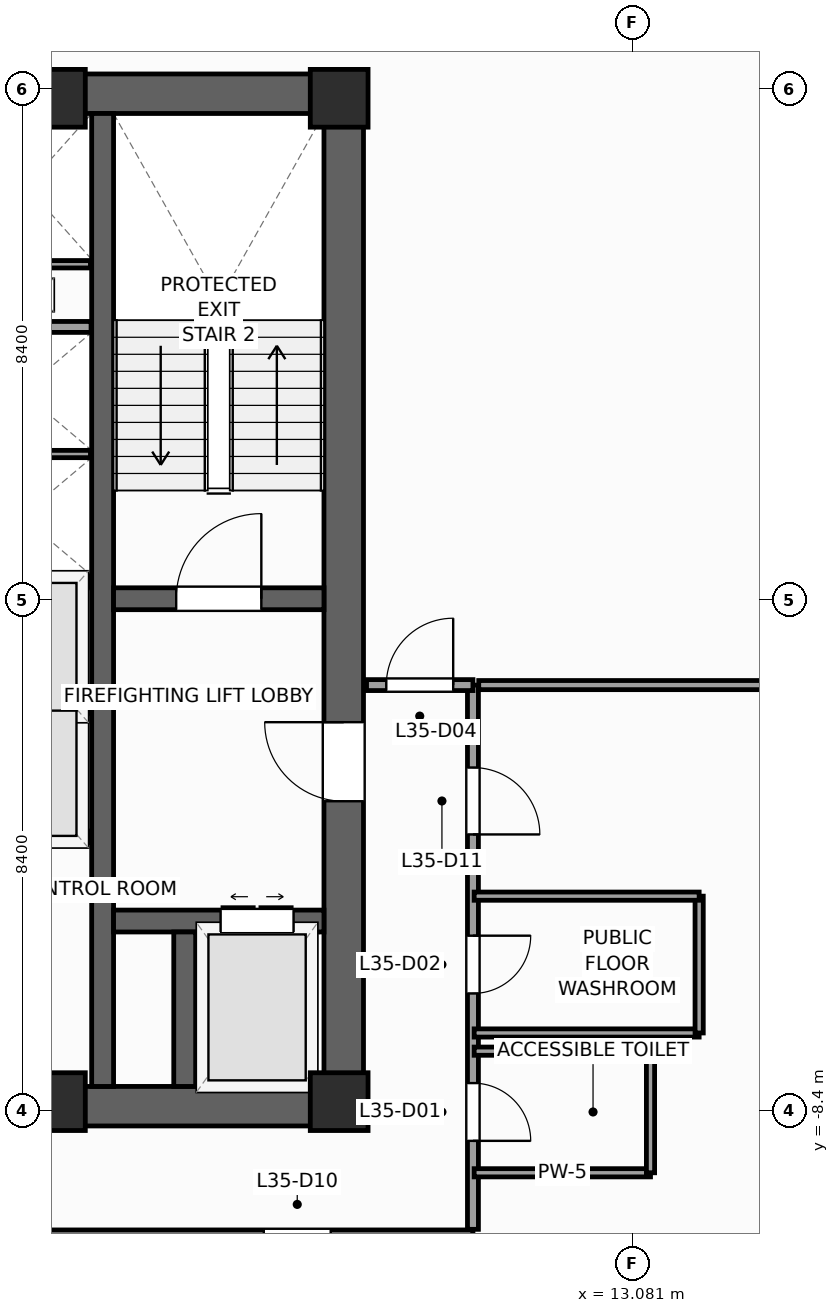
"""IFC4 building model, lengths in metres.
Left out: names, types, materials, properties, quantities, classifications, styles, units other than length and angle.
Written with IfcOpenShell. Run it as: python <this file> out.ifc"""

import sys

from ifc_helpers import new_model, si_unit, direction, frame, frame_2d, origin, origin_2d, place, context, subcontext, project, spatial, rectangle, extrude, source, transform, mapped, element, fill, save


model = new_model("IFC4")
c1 = context("Model", 3, precision=1e-05, world=origin(), true_north=direction((0.0, 1.0)))
c2 = subcontext(c1, "Body", "Model", "MODEL_VIEW")
j1 = project(units=[si_unit("LENGTHUNIT", "METRE"), si_unit("PLANEANGLEUNIT", "RADIAN")], contexts=[c1])
p1 = place(None, origin())
s1 = spatial("IfcSite", under=j1, at=p1, CompositionType="ELEMENT")
p2 = place(p1, origin())
s2 = spatial("IfcBuilding", under=s1, at=p2, CompositionType="ELEMENT")
p3 = place(p2, frame((0.0, 0.0, 148.4)))
s3 = spatial("IfcBuildingStorey", under=s2, at=p3, CompositionType="ELEMENT", Elevation=148.4)
p4 = place(p3, frame((-8.65, -8.325, 0.0), z_axis=(0.0, 0.0, 1.0), x_axis=(1.0, 0.0, 0.0)))
e1 = element("IfcWall", 1, at=p4, inside=s3, PredefinedType="SHEAR", context=c2, shape_type="SweptSolid", body=[
    extrude(rectangle(XDim=17.3, YDim=0.65, at=frame_2d((8.65, 0.0))), origin(), (0.0, 0.0, 1.0), 4.0),
])
p5 = place(p4, frame((8.0, 0.0, 0.0)))
e2 = element("IfcOpeningElement", 2, at=p5, cuts=e1, PredefinedType="OPENING", context=c2, shape_type="SweptSolid", body=[
    extrude(rectangle(XDim=1.3, YDim=2.2, at=frame_2d((0.65, 1.1))), frame((0.0, 0.335, 0.0), z_axis=(0.0, -1.0, 0.0), x_axis=(1.0, 0.0, 0.0)), (0.0, 0.0, 1.0), 0.67),
])
p6 = place(p3, frame((-8.65, 8.325, 0.0), z_axis=(0.0, 0.0, 1.0), x_axis=(1.0, 0.0, 0.0)))
e3 = element("IfcWall", 3, at=p6, inside=s3, PredefinedType="SHEAR", context=c2, shape_type="SweptSolid", body=[
    extrude(rectangle(XDim=17.3, YDim=0.65, at=frame_2d((8.65, 0.0))), origin(), (0.0, 0.0, 1.0), 4.0),
])
p7 = place(p3, frame((8.325, -8.0, 0.0), z_axis=(0.0, 0.0, 1.0), x_axis=(0.0, 1.0, 0.0)))
e4 = element("IfcWall", 4, at=p7, inside=s3, PredefinedType="SHEAR", context=c2, shape_type="SweptSolid", body=[
    extrude(rectangle(XDim=16.0, YDim=0.65, at=frame_2d((8.0, 0.0))), origin(), (0.0, 0.0, 1.0), 4.0),
])
p8 = place(p7, frame((4.69, 0.0, 0.0)))
e5 = element("IfcOpeningElement", 5, at=p8, cuts=e4, PredefinedType="OPENING", context=c2, shape_type="SweptSolid", body=[
    extrude(rectangle(XDim=1.3, YDim=2.2, at=frame_2d((0.65, 1.1))), frame((0.0, 0.335, 0.0), z_axis=(0.0, -1.0, 0.0), x_axis=(1.0, 0.0, 0.0)), (0.0, 0.0, 1.0), 0.67),
])
p9 = place(p3, frame((4.36, -8.0, 0.0), z_axis=(0.0, 0.0, 1.0), x_axis=(0.0, 1.0, 0.0)))
e6 = element("IfcWall", 6, at=p9, inside=s3, PredefinedType="SHEAR", context=c2, shape_type="SweptSolid", body=[
    extrude(rectangle(XDim=16.0, YDim=0.36, at=frame_2d((8.0, 0.0))), origin(), (0.0, 0.0, 1.0), 4.0),
])
p10 = place(p3, frame((4.54, 0.02, 0.0), z_axis=(0.0, 0.0, 1.0), x_axis=(1.0, 0.0, 0.0)))
e7 = element("IfcWall", 7, at=p10, inside=s3, PredefinedType="SHEAR", context=c2, shape_type="SweptSolid", body=[
    extrude(rectangle(XDim=3.46, YDim=0.36, at=frame_2d((1.73, 0.0))), origin(), (0.0, 0.0, 1.0), 4.0),
])
p11 = place(p10, frame((1.03, 0.0, 0.0)))
e8 = element("IfcOpeningElement", 8, at=p11, cuts=e7, PredefinedType="OPENING", context=c2, shape_type="SweptSolid", body=[
    extrude(rectangle(XDim=1.4, YDim=2.2, at=frame_2d((0.7, 1.1))), frame((0.0, 0.19, 0.0), z_axis=(0.0, -1.0, 0.0), x_axis=(1.0, 0.0, 0.0)), (0.0, 0.0, 1.0), 0.38),
])
p12 = place(p3, frame((4.54, -5.28, 0.0), z_axis=(0.0, 0.0, 1.0), x_axis=(1.0, 0.0, 0.0)))
e9 = element("IfcWall", 9, at=p12, inside=s3, PredefinedType="SHEAR", context=c2, shape_type="SweptSolid", body=[
    extrude(rectangle(XDim=3.46, YDim=0.36, at=frame_2d((1.73, 0.0))), origin(), (0.0, 0.0, 1.0), 4.0),
])
p13 = place(p12, frame((1.76, 0.0, 0.0)))
e10 = element("IfcOpeningElement", 10, at=p13, cuts=e9, PredefinedType="OPENING", context=c2, shape_type="SweptSolid", body=[
    extrude(rectangle(XDim=1.2, YDim=2.25, at=frame_2d((0.6, 1.125))), frame((0.0, 0.19, 0.0), z_axis=(0.0, -1.0, 0.0), x_axis=(1.0, 0.0, 0.0)), (0.0, 0.0, 1.0), 0.38),
])
p14 = place(p3, frame((5.71, -8.0, 0.0), z_axis=(0.0, 0.0, 1.0), x_axis=(0.0, 1.0, 0.0)))
e11 = element("IfcWall", 11, at=p14, inside=s3, PredefinedType="SHEAR", context=c2, shape_type="SweptSolid", body=[
    extrude(rectangle(XDim=2.54, YDim=0.36, at=frame_2d((1.27, 0.0))), origin(), (0.0, 0.0, 1.0), 4.0),
])
m1 = source(origin(), c2, "Body", "SweptSolid", [
    extrude(rectangle(XDim=0.95, YDim=0.95, at=origin_2d()), origin(), (0.0, 0.0, 1.0), 4.0),
])
for number, where, z_axis, x_axis in (
    (12, (8.25, -8.25, 0.0), (0.0, 0.0, 1.0), (1.0, 0.0, 0.0)),
    (13, (8.25, 8.25, 0.0), (0.0, 0.0, 1.0), (1.0, 0.0, 0.0)),
    (14, (3.6, -8.25, 0.0), (0.0, 0.0, 1.0), (1.0, 0.0, 0.0)),
    (15, (3.6, 8.25, 0.0), (0.0, 0.0, 1.0), (1.0, 0.0, 0.0)),
):
    element("IfcColumn", number, at=place(p3, frame(where, z_axis=z_axis, x_axis=x_axis)), inside=s3, PredefinedType="PILASTER", context=c2, shape_type="MappedRepresentation", body=[
        mapped(m1, transform((0.0, 0.0, 0.0), scale=1.0)),
    ])
p15 = place(p3, frame((-2.972, -32.558, 0.0), z_axis=(0.0, 0.0, 1.0), x_axis=(0.829036218961, 0.559194910251, 0.0)))
e16 = element("IfcWall", 16, at=p15, inside=s3, PredefinedType="STANDARD", context=c2, shape_type="SweptSolid", body=[
    extrude(rectangle(XDim=41.34, YDim=0.34, at=frame_2d((20.67, 0.0))), origin(), (0.0, 0.0, 1.0), 3.04),
])
p16 = place(p15, frame((25.745, 0.0, 0.0)))
e17 = element("IfcOpeningElement", 17, at=p16, cuts=e16, PredefinedType="OPENING", context=c2, shape_type="SweptSolid", body=[
    extrude(rectangle(XDim=1.05, YDim=2.25, at=frame_2d((0.525, 1.125))), frame((0.0, 0.18, 0.0), z_axis=(0.0, -1.0, 0.0), x_axis=(1.0, 0.0, 0.0)), (0.0, 0.0, 1.0), 0.36),
])
p17 = place(p15, frame((4.261, 0.0, 0.56)))
e18 = element("IfcOpeningElement", 18, at=p17, cuts=e16, PredefinedType="OPENING", context=c2, shape_type="SweptSolid", body=[
    extrude(rectangle(XDim=1.4, YDim=2.4, at=frame_2d((0.7, 1.2))), frame((0.0, 0.18, 0.0), z_axis=(0.0, -1.0, 0.0), x_axis=(1.0, 0.0, 0.0)), (0.0, 0.0, 1.0), 0.36),
])
p18 = place(p15, frame((11.064, 0.0, 0.61)))
e19 = element("IfcOpeningElement", 19, at=p18, cuts=e16, PredefinedType="OPENING", context=c2, shape_type="SweptSolid", body=[
    extrude(rectangle(XDim=1.85, YDim=2.35, at=frame_2d((0.925, 1.175))), frame((0.0, 0.18, 0.0), z_axis=(0.0, -1.0, 0.0), x_axis=(1.0, 0.0, 0.0)), (0.0, 0.0, 1.0), 0.36),
])
p19 = place(p15, frame((18.168, 0.0, 0.61)))
e20 = element("IfcOpeningElement", 20, at=p19, cuts=e16, PredefinedType="OPENING", context=c2, shape_type="SweptSolid", body=[
    extrude(rectangle(XDim=1.85, YDim=2.35, at=frame_2d((0.925, 1.175))), frame((0.0, 0.18, 0.0), z_axis=(0.0, -1.0, 0.0), x_axis=(1.0, 0.0, 0.0)), (0.0, 0.0, 1.0), 0.36),
])
p20 = place(p15, frame((27.936, 0.0, 0.61)))
e21 = element("IfcOpeningElement", 21, at=p20, cuts=e16, PredefinedType="OPENING", context=c2, shape_type="SweptSolid", body=[
    extrude(rectangle(XDim=1.85, YDim=2.35, at=frame_2d((0.925, 1.175))), frame((0.0, 0.18, 0.0), z_axis=(0.0, -1.0, 0.0), x_axis=(1.0, 0.0, 0.0)), (0.0, 0.0, 1.0), 0.36),
])
p21 = place(p15, frame((34.852, 0.0, 0.56)))
e22 = element("IfcOpeningElement", 22, at=p21, cuts=e16, PredefinedType="OPENING", context=c2, shape_type="SweptSolid", body=[
    extrude(rectangle(XDim=1.4, YDim=2.4, at=frame_2d((0.7, 1.2))), frame((0.0, 0.18, 0.0), z_axis=(0.0, -1.0, 0.0), x_axis=(1.0, 0.0, 0.0)), (0.0, 0.0, 1.0), 0.36),
])
p22 = place(p3, frame((32.558, -2.972, 0.0), z_axis=(0.0, 0.0, 1.0), x_axis=(-0.559194910251, 0.829036218961, 0.0)))
e23 = element("IfcWall", 23, at=p22, inside=s3, PredefinedType="STANDARD", context=c2, shape_type="SweptSolid", body=[
    extrude(rectangle(XDim=41.34, YDim=0.34, at=frame_2d((20.67, 0.0))), origin(), (0.0, 0.0, 1.0), 3.04),
])
p23 = place(p22, frame((4.261, 0.0, 0.56)))
e24 = element("IfcOpeningElement", 24, at=p23, cuts=e23, PredefinedType="OPENING", context=c2, shape_type="SweptSolid", body=[
    extrude(rectangle(XDim=1.4, YDim=2.4, at=frame_2d((0.7, 1.2))), frame((0.0, 0.18, 0.0), z_axis=(0.0, -1.0, 0.0), x_axis=(1.0, 0.0, 0.0)), (0.0, 0.0, 1.0), 0.36),
])
p24 = place(p22, frame((11.064, 0.0, 0.61)))
e25 = element("IfcOpeningElement", 25, at=p24, cuts=e23, PredefinedType="OPENING", context=c2, shape_type="SweptSolid", body=[
    extrude(rectangle(XDim=1.85, YDim=2.35, at=frame_2d((0.925, 1.175))), frame((0.0, 0.18, 0.0), z_axis=(0.0, -1.0, 0.0), x_axis=(1.0, 0.0, 0.0)), (0.0, 0.0, 1.0), 0.36),
])
p25 = place(p22, frame((18.168, 0.0, 0.61)))
e26 = element("IfcOpeningElement", 26, at=p25, cuts=e23, PredefinedType="OPENING", context=c2, shape_type="SweptSolid", body=[
    extrude(rectangle(XDim=1.85, YDim=2.35, at=frame_2d((0.925, 1.175))), frame((0.0, 0.18, 0.0), z_axis=(0.0, -1.0, 0.0), x_axis=(1.0, 0.0, 0.0)), (0.0, 0.0, 1.0), 0.36),
])
p26 = place(p22, frame((27.186, 0.0, 0.61)))
e27 = element("IfcOpeningElement", 27, at=p26, cuts=e23, PredefinedType="OPENING", context=c2, shape_type="SweptSolid", body=[
    extrude(rectangle(XDim=1.85, YDim=2.35, at=frame_2d((0.925, 1.175))), frame((0.0, 0.18, 0.0), z_axis=(0.0, -1.0, 0.0), x_axis=(1.0, 0.0, 0.0)), (0.0, 0.0, 1.0), 0.36),
])
p27 = place(p22, frame((34.852, 0.0, 0.56)))
e28 = element("IfcOpeningElement", 28, at=p27, cuts=e23, PredefinedType="OPENING", context=c2, shape_type="SweptSolid", body=[
    extrude(rectangle(XDim=1.4, YDim=2.4, at=frame_2d((0.7, 1.2))), frame((0.0, 0.18, 0.0), z_axis=(0.0, -1.0, 0.0), x_axis=(1.0, 0.0, 0.0)), (0.0, 0.0, 1.0), 0.36),
])
for number, where, z_axis, x_axis in (
    (29, (1.89, -3.9, 0.0), (0.0, 0.0, 1.0), (1.0, 0.0, 0.0)),
    (30, (1.89, 0.3, 0.0), (0.0, 0.0, 1.0), (1.0, 0.0, 0.0)),
    (31, (1.89, 4.49, 0.0), (0.0, 0.0, 1.0), (1.0, 0.0, 0.0)),
):
    element("IfcWall", number, at=place(p3, frame(where, z_axis=z_axis, x_axis=x_axis)), inside=s3, PredefinedType="PARTITIONING", context=c2, shape_type="SweptSolid", body=[
        extrude(rectangle(XDim=2.28, YDim=0.18, at=frame_2d((1.14, 0.0))), origin(), (0.0, 0.0, 1.0), 3.74),
    ])
for number, where, z_axis, x_axis in (
    (32, (1.9, -1.8, 0.0), (0.0, 0.0, 1.0), (1.0, 0.0, 0.0)),
    (33, (1.9, 2.4, 0.0), (0.0, 0.0, 1.0), (1.0, 0.0, 0.0)),
):
    element("IfcWall", number, at=place(p3, frame(where, z_axis=z_axis, x_axis=x_axis)), inside=s3, PredefinedType="PARTITIONING", context=c2, shape_type="SweptSolid", body=[
        extrude(rectangle(XDim=2.26, YDim=0.12, at=frame_2d((1.13, 0.0))), origin(), (0.0, 0.0, 1.0), 3.74),
    ])
p28 = place(p3, frame((2.06, 5.52, 0.0), z_axis=(0.0, 0.0, 1.0), x_axis=(1.0, 0.0, 0.0)))
e34 = element("IfcWall", 34, at=p28, inside=s3, PredefinedType="PARTITIONING", context=c2, shape_type="SweptSolid", body=[
    extrude(rectangle(XDim=2.1, YDim=0.12, at=frame_2d((1.05, 0.0))), origin(), (0.0, 0.0, 1.0), 3.74),
])
p29 = place(p3, frame((-10.45, -10.45, 0.0), z_axis=(0.0, 0.0, 1.0), x_axis=(1.0, 0.0, 0.0)))
e35 = element("IfcWall", 35, at=p29, inside=s3, PredefinedType="PARTITIONING", context=c2, shape_type="SweptSolid", body=[
    extrude(rectangle(XDim=20.9, YDim=0.18, at=frame_2d((10.45, 0.0))), origin(), (0.0, 0.0, 1.0), 3.74),
])
p30 = place(p29, frame((2.339, 0.0, 0.0)))
e36 = element("IfcOpeningElement", 36, at=p30, cuts=e35, PredefinedType="OPENING", context=c2, shape_type="SweptSolid", body=[
    extrude(rectangle(XDim=1.1, YDim=2.2, at=frame_2d((0.55, 1.1))), frame((0.0, 0.1, 0.0), z_axis=(0.0, -1.0, 0.0), x_axis=(1.0, 0.0, 0.0)), (0.0, 0.0, 1.0), 0.2),
])
p31 = place(p29, frame((7.4, 0.0, 0.0)))
e37 = element("IfcOpeningElement", 37, at=p31, cuts=e35, PredefinedType="OPENING", context=c2, shape_type="SweptSolid", body=[
    extrude(rectangle(XDim=1.1, YDim=2.2, at=frame_2d((0.55, 1.1))), frame((0.0, 0.1, 0.0), z_axis=(0.0, -1.0, 0.0), x_axis=(1.0, 0.0, 0.0)), (0.0, 0.0, 1.0), 0.2),
])
p32 = place(p29, frame((12.4, 0.0, 0.0)))
e38 = element("IfcOpeningElement", 38, at=p32, cuts=e35, PredefinedType="OPENING", context=c2, shape_type="SweptSolid", body=[
    extrude(rectangle(XDim=1.1, YDim=2.2, at=frame_2d((0.55, 1.1))), frame((0.0, 0.1, 0.0), z_axis=(0.0, -1.0, 0.0), x_axis=(1.0, 0.0, 0.0)), (0.0, 0.0, 1.0), 0.2),
])
p33 = place(p29, frame((17.46, 0.0, 0.0)))
e39 = element("IfcOpeningElement", 39, at=p33, cuts=e35, PredefinedType="OPENING", context=c2, shape_type="SweptSolid", body=[
    extrude(rectangle(XDim=1.1, YDim=2.2, at=frame_2d((0.55, 1.1))), frame((0.0, 0.1, 0.0), z_axis=(0.0, -1.0, 0.0), x_axis=(1.0, 0.0, 0.0)), (0.0, 0.0, 1.0), 0.2),
])
p34 = place(p3, frame((10.45, -10.35, 0.0), z_axis=(0.0, 0.0, 1.0), x_axis=(0.0, 1.0, 0.0)))
e40 = element("IfcWall", 40, at=p34, inside=s3, PredefinedType="PARTITIONING", context=c2, shape_type="SweptSolid", body=[
    extrude(rectangle(XDim=8.95, YDim=0.18, at=frame_2d((4.475, 0.0))), origin(), (0.0, 0.0, 1.0), 3.74),
])
p35 = place(p34, frame((1.455, 0.0, 0.0)))
e41 = element("IfcOpeningElement", 41, at=p35, cuts=e40, PredefinedType="OPENING", context=c2, shape_type="SweptSolid", body=[
    extrude(rectangle(XDim=0.95, YDim=2.1, at=frame_2d((0.475, 1.05))), frame((0.0, 0.1, 0.0), z_axis=(0.0, -1.0, 0.0), x_axis=(1.0, 0.0, 0.0)), (0.0, 0.0, 1.0), 0.2),
])
p36 = place(p34, frame((3.879, 0.0, 0.0)))
e42 = element("IfcOpeningElement", 42, at=p36, cuts=e40, PredefinedType="OPENING", context=c2, shape_type="SweptSolid", body=[
    extrude(rectangle(XDim=0.95, YDim=2.1, at=frame_2d((0.475, 1.05))), frame((0.0, 0.1, 0.0), z_axis=(0.0, -1.0, 0.0), x_axis=(1.0, 0.0, 0.0)), (0.0, 0.0, 1.0), 0.2),
])
p37 = place(p34, frame((6.494, 0.0, 0.0)))
e43 = element("IfcOpeningElement", 43, at=p37, cuts=e40, PredefinedType="OPENING", context=c2, shape_type="SweptSolid", body=[
    extrude(rectangle(XDim=1.1, YDim=2.2, at=frame_2d((0.55, 1.1))), frame((0.0, 0.1, 0.0), z_axis=(0.0, -1.0, 0.0), x_axis=(1.0, 0.0, 0.0)), (0.0, 0.0, 1.0), 0.2),
])
p38 = place(p3, frame((8.7, -1.4, 0.0), z_axis=(0.0, 0.0, 1.0), x_axis=(1.0, 0.0, 0.0)))
e44 = element("IfcWall", 44, at=p38, inside=s3, PredefinedType="PARTITIONING", context=c2, shape_type="SweptSolid", body=[
    extrude(rectangle(XDim=1.75, YDim=0.18, at=frame_2d((0.875, 0.0))), origin(), (0.0, 0.0, 1.0), 3.74),
])
p39 = place(p38, frame((0.325, 0.0, 0.0)))
e45 = element("IfcOpeningElement", 45, at=p39, cuts=e44, PredefinedType="OPENING", context=c2, shape_type="SweptSolid", body=[
    extrude(rectangle(XDim=1.1, YDim=2.2, at=frame_2d((0.55, 1.1))), frame((0.0, 0.1, 0.0), z_axis=(0.0, -1.0, 0.0), x_axis=(1.0, 0.0, 0.0)), (0.0, 0.0, 1.0), 0.2),
])
p40 = place(p3, frame((10.545, -1.4, 0.0), z_axis=(0.0, 0.0, 1.0), x_axis=(1.0, 0.0, 0.0)))
e46 = element("IfcWall", 46, at=p40, inside=s3, PredefinedType="PARTITIONING", context=c2, shape_type="SweptSolid", body=[
    extrude(rectangle(XDim=20.826, YDim=0.15, at=frame_2d((10.413, 0.0))), origin(), (0.0, 0.0, 1.0), 3.74),
])
p41 = place(p3, frame((10.47, -9.42, 0.0), z_axis=(0.0, 0.0, 1.0), x_axis=(1.0, 0.0, 0.0)))
e47 = element("IfcWall", 47, at=p41, inside=s3, PredefinedType="PARTITIONING", context=c2, shape_type="SweptSolid", body=[
    extrude(rectangle(XDim=2.9, YDim=0.135, at=frame_2d((1.45, 0.0))), origin(), (0.0, 0.0, 1.0), 3.74),
])
p42 = place(p3, frame((13.37, -9.42, 0.0), z_axis=(0.0, 0.0, 1.0), x_axis=(0.0, 1.0, 0.0)))
e48 = element("IfcWall", 48, at=p42, inside=s3, PredefinedType="PARTITIONING", context=c2, shape_type="SweptSolid", body=[
    extrude(rectangle(XDim=2.0, YDim=0.135, at=frame_2d((1.0, 0.0))), origin(), (0.0, 0.0, 1.0), 2.84),
])
p43 = place(p3, frame((10.47, -7.42, 0.0), z_axis=(0.0, 0.0, 1.0), x_axis=(1.0, 0.0, 0.0)))
e49 = element("IfcWall", 49, at=p43, inside=s3, PredefinedType="PARTITIONING", context=c2, shape_type="SweptSolid", body=[
    extrude(rectangle(XDim=2.9, YDim=0.135, at=frame_2d((1.45, 0.0))), origin(), (0.0, 0.0, 1.0), 3.74),
])
p44 = place(p3, frame((10.47, -7.121, 0.0), z_axis=(0.0, 0.0, 1.0), x_axis=(1.0, 0.0, 0.0)))
e50 = element("IfcWall", 50, at=p44, inside=s3, PredefinedType="PARTITIONING", context=c2, shape_type="SweptSolid", body=[
    extrude(rectangle(XDim=3.7, YDim=0.135, at=frame_2d((1.85, 0.0))), origin(), (0.0, 0.0, 1.0), 3.74),
])
p45 = place(p3, frame((14.17, -7.121, 0.0), z_axis=(0.0, 0.0, 1.0), x_axis=(0.0, 1.0, 0.0)))
e51 = element("IfcWall", 51, at=p45, inside=s3, PredefinedType="PARTITIONING", context=c2, shape_type="SweptSolid", body=[
    extrude(rectangle(XDim=2.25, YDim=0.135, at=frame_2d((1.125, 0.0))), origin(), (0.0, 0.0, 1.0), 3.74),
])
p46 = place(p3, frame((10.47, -4.871, 0.0), z_axis=(0.0, 0.0, 1.0), x_axis=(1.0, 0.0, 0.0)))
e52 = element("IfcWall", 52, at=p46, inside=s3, PredefinedType="PARTITIONING", context=c2, shape_type="SweptSolid", body=[
    extrude(rectangle(XDim=3.7, YDim=0.135, at=frame_2d((1.85, 0.0))), origin(), (0.0, 0.0, 1.0), 3.74),
])
m2 = source(origin(), c2, "Body", "SweptSolid", [
    extrude(rectangle(XDim=1.4, YDim=2.2, at=frame_2d((0.7, 1.1))), frame((0.0, 0.025, 0.0), z_axis=(0.0, -1.0, 0.0), x_axis=(1.0, 0.0, 0.0)), (0.0, 0.0, 1.0), 0.05),
])
p47 = place(p11, origin())
e53 = element("IfcDoor", 53, at=p47, inside=s3, OperationType="SINGLE_SWING_RIGHT", PredefinedType="DOOR", context=c2, shape_type="MappedRepresentation", body=[
    mapped(m2, transform((0.0, 0.0, 0.0), scale=1.0)),
])
fill(e8, e53)
m3 = source(origin(), c2, "Body", "SweptSolid", [
    extrude(rectangle(XDim=1.3, YDim=2.2, at=frame_2d((0.65, 1.1))), frame((0.0, 0.025, 0.0), z_axis=(0.0, -1.0, 0.0), x_axis=(1.0, 0.0, 0.0)), (0.0, 0.0, 1.0), 0.05),
])
p48 = place(p8, origin())
e54 = element("IfcDoor", 54, at=p48, inside=s3, OperationType="SINGLE_SWING_RIGHT", PredefinedType="DOOR", context=c2, shape_type="MappedRepresentation", body=[
    mapped(m3, transform((0.0, 0.0, 0.0), scale=1.0)),
])
fill(e5, e54)
m4 = source(origin(), c2, "Body", "SweptSolid", [
    extrude(rectangle(XDim=1.2, YDim=2.25, at=frame_2d((0.6, 1.125))), frame((0.0, 0.025, 0.0), z_axis=(0.0, -1.0, 0.0), x_axis=(1.0, 0.0, 0.0)), (0.0, 0.0, 1.0), 0.05),
])
p49 = place(p13, origin())
e55 = element("IfcDoor", 55, at=p49, inside=s3, OperationType="DOUBLE_DOOR_SLIDING", PredefinedType="DOOR", context=c2, shape_type="MappedRepresentation", body=[
    mapped(m4, transform((0.0, 0.0, 0.0), scale=1.0)),
])
fill(e10, e55)
m5 = source(origin(), c2, "Body", "SweptSolid", [
    extrude(rectangle(XDim=0.95, YDim=2.1, at=frame_2d((0.475, 1.05))), frame((0.0, 0.025, 0.0), z_axis=(0.0, -1.0, 0.0), x_axis=(1.0, 0.0, 0.0)), (0.0, 0.0, 1.0), 0.05),
])
p50 = place(p35, frame((0.95, 0.0, 0.0), z_axis=(0.0, 0.0, 1.0), x_axis=(-1.0, 0.0, 0.0)))
e56 = element("IfcDoor", 56, at=p50, inside=s3, OperationType="SINGLE_SWING_LEFT", PredefinedType="DOOR", context=c2, shape_type="MappedRepresentation", body=[
    mapped(m5, transform((0.0, 0.0, 0.0), scale=1.0)),
])
fill(e41, e56)
p51 = place(p36, frame((0.95, 0.0, 0.0), z_axis=(0.0, 0.0, 1.0), x_axis=(-1.0, 0.0, 0.0)))
e57 = element("IfcDoor", 57, at=p51, inside=s3, OperationType="SINGLE_SWING_RIGHT", PredefinedType="DOOR", context=c2, shape_type="MappedRepresentation", body=[
    mapped(m5, transform((0.0, 0.0, 0.0), scale=1.0)),
])
fill(e42, e57)
m6 = source(origin(), c2, "Body", "SweptSolid", [
    extrude(rectangle(XDim=1.1, YDim=2.2, at=frame_2d((0.55, 1.1))), frame((0.0, 0.025, 0.0), z_axis=(0.0, -1.0, 0.0), x_axis=(1.0, 0.0, 0.0)), (0.0, 0.0, 1.0), 0.05),
])
p52 = place(p39, origin())
e58 = element("IfcDoor", 58, at=p52, inside=s3, OperationType="SINGLE_SWING_RIGHT", PredefinedType="DOOR", context=c2, shape_type="MappedRepresentation", body=[
    mapped(m6, transform((0.0, 0.0, 0.0), scale=1.0)),
])
fill(e45, e58)
p53 = place(p37, frame((1.1, 0.0, 0.0), z_axis=(0.0, 0.0, 1.0), x_axis=(-1.0, 0.0, 0.0)))
e59 = element("IfcDoor", 59, at=p53, inside=s3, OperationType="SINGLE_SWING_LEFT", PredefinedType="DOOR", context=c2, shape_type="MappedRepresentation", body=[
    mapped(m6, transform((0.0, 0.0, 0.0), scale=1.0)),
])
fill(e43, e59)
save(model, sys.argv[1])
